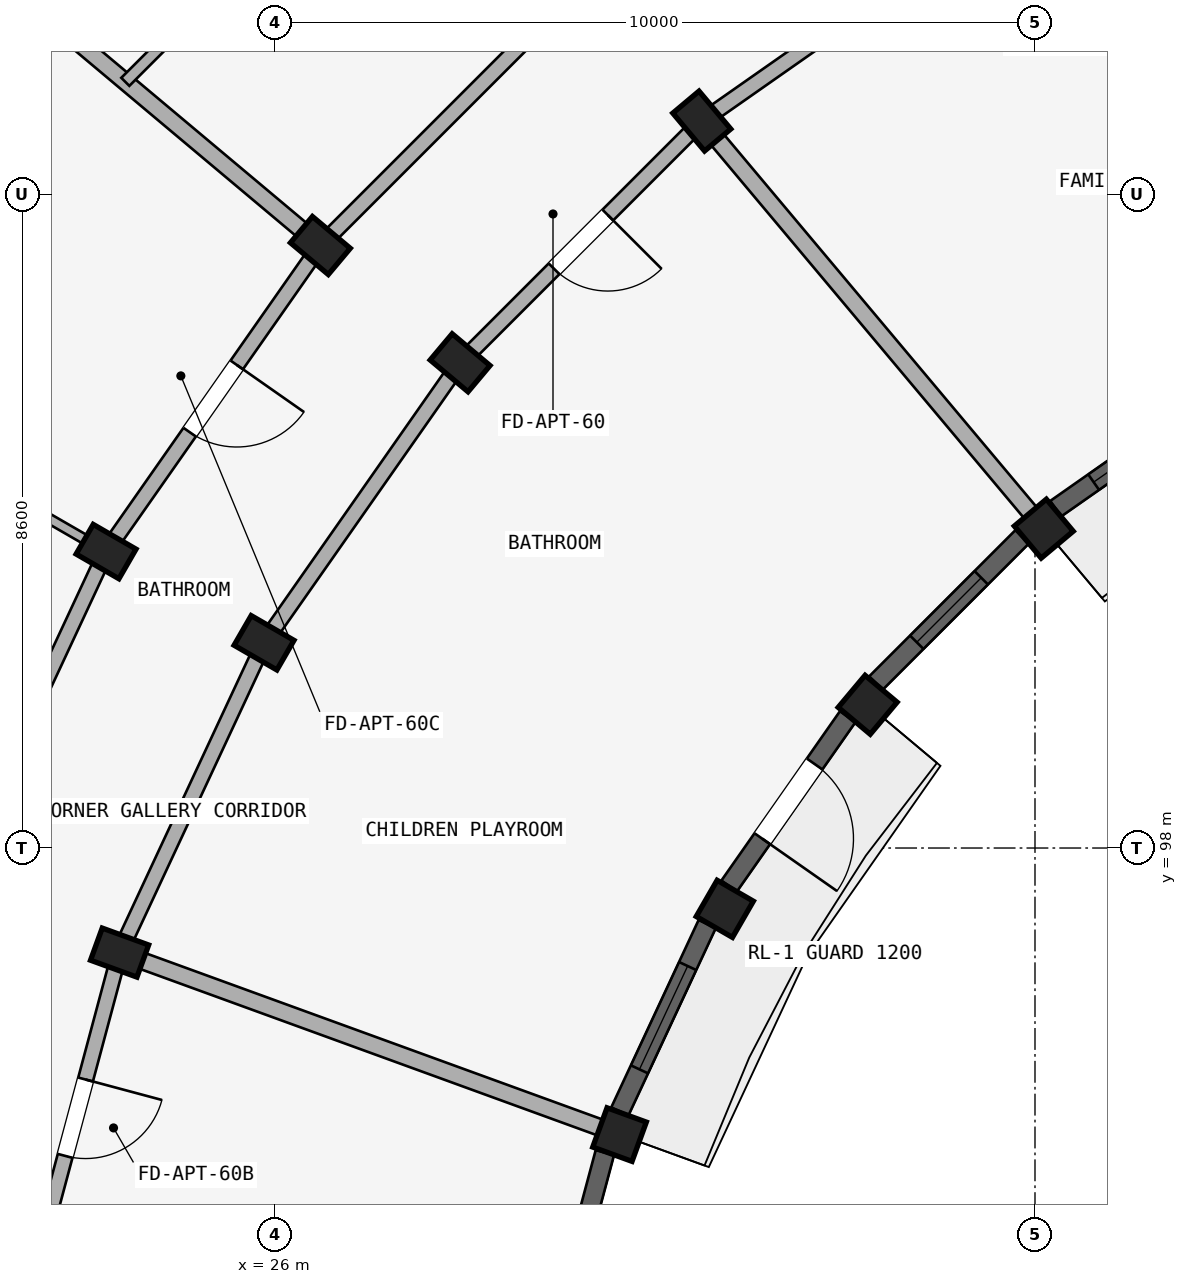
"""IFC4 building model, lengths in metres.
Left out: names, types, materials, properties, quantities, classifications, styles, units other than length and angle.
Written with IfcOpenShell. Run it as: python <this file> out.ifc"""

import sys

from ifc_helpers import new_model, si_unit, direction, frame, frame_2d, origin, origin_2d, place, context, subcontext, project, spatial, rectangle, extrude, element, fill, save


model = new_model("IFC4")
c1 = context("Model", 3, precision=1e-05, world=origin(), true_north=direction((0.0, 1.0)))
c2 = subcontext(c1, "Body", "Model", "MODEL_VIEW")
j1 = project(units=[si_unit("LENGTHUNIT", "METRE"), si_unit("PLANEANGLEUNIT", "RADIAN")], contexts=[c1])
p1 = place(None, origin())
s1 = spatial("IfcSite", under=j1, at=p1, CompositionType="ELEMENT")
p2 = place(p1, origin())
s2 = spatial("IfcBuilding", under=s1, at=p2, CompositionType="ELEMENT")
p3 = place(p2, frame((0.0, 0.0, 33.9)))
s3 = spatial("IfcBuildingStorey", under=s2, at=p3, CompositionType="ELEMENT", Elevation=33.9)
p4 = place(p3, frame((36.115, 102.202, 0.0), z_axis=(0.0, 0.0, 1.0), x_axis=(0.766044443119, 0.642787609687, 0.0)))
e1 = element("IfcColumn", 1, at=p4, inside=s3, PredefinedType="COLUMN", context=c2, shape_type="SweptSolid", body=[
    extrude(rectangle(XDim=0.55, YDim=0.55, at=origin_2d()), origin(), (0.0, 0.0, 1.0), 2.93),
])
p5 = place(p3, frame((31.616, 107.564, 0.0), z_axis=(0.0, 0.0, 1.0), x_axis=(0.766044443119, 0.642787609687, 0.0)))
e2 = element("IfcColumn", 2, at=p5, inside=s3, PredefinedType="COLUMN", context=c2, shape_type="SweptSolid", body=[
    extrude(rectangle(XDim=0.45, YDim=0.65, at=origin_2d()), origin(), (0.0, 0.0, 1.0), 2.93),
])
p6 = place(p3, frame((33.798, 99.885, 0.0), z_axis=(0.0, 0.0, 1.0), x_axis=(0.642787609687, 0.766044443119, 0.0)))
e3 = element("IfcColumn", 3, at=p6, inside=s3, PredefinedType="COLUMN", context=c2, shape_type="SweptSolid", body=[
    extrude(rectangle(XDim=0.55, YDim=0.55, at=origin_2d()), origin(), (0.0, 0.0, 1.0), 2.93),
])
for number, where, z_axis, x_axis in (
    (4, (28.436, 104.384, 0.0), (0.0, 0.0, 1.0), (0.643, 0.766, 0.0)),
    (5, (26.598, 105.927, 0.0), (0.0, 0.0, 1.0), (0.643, 0.766, 0.0)),
):
    element("IfcColumn", number, at=place(p3, frame(where, z_axis=z_axis, x_axis=x_axis)), inside=s3, PredefinedType="COLUMN", context=c2, shape_type="SweptSolid", body=[
        extrude(rectangle(XDim=0.45, YDim=0.65, at=origin_2d()), origin(), (0.0, 0.0, 1.0), 2.93),
    ])
p7 = place(p3, frame((31.919, 97.2, 0.0), z_axis=(0.0, 0.0, 1.0), x_axis=(0.5, 0.866025403784, 0.0)))
e6 = element("IfcColumn", 6, at=p7, inside=s3, PredefinedType="COLUMN", context=c2, shape_type="SweptSolid", body=[
    extrude(rectangle(XDim=0.55, YDim=0.55, at=origin_2d()), origin(), (0.0, 0.0, 1.0), 2.93),
])
for number, where, z_axis, x_axis in (
    (7, (25.856, 100.7, 0.0), (0.0, 0.0, 1.0), (0.5, 0.866, 0.0)),
    (8, (23.778, 101.9, 0.0), (0.0, 0.0, 1.0), (0.5, 0.866, 0.0)),
):
    element("IfcColumn", number, at=place(p3, frame(where, z_axis=z_axis, x_axis=x_axis)), inside=s3, PredefinedType="COLUMN", context=c2, shape_type="SweptSolid", body=[
        extrude(rectangle(XDim=0.45, YDim=0.65, at=origin_2d()), origin(), (0.0, 0.0, 1.0), 2.93),
    ])
p8 = place(p3, frame((30.534, 94.23, 0.0), z_axis=(0.0, 0.0, 1.0), x_axis=(0.342020143326, 0.939692620786, 0.0)))
e9 = element("IfcColumn", 9, at=p8, inside=s3, PredefinedType="COLUMN", context=c2, shape_type="SweptSolid", body=[
    extrude(rectangle(XDim=0.55, YDim=0.55, at=origin_2d()), origin(), (0.0, 0.0, 1.0), 2.93),
])
p9 = place(p3, frame((23.956, 96.624, 0.0), z_axis=(0.0, 0.0, 1.0), x_axis=(0.342020143326, 0.939692620786, 0.0)))
e10 = element("IfcColumn", 10, at=p9, inside=s3, PredefinedType="COLUMN", context=c2, shape_type="SweptSolid", body=[
    extrude(rectangle(XDim=0.45, YDim=0.65, at=origin_2d()), origin(), (0.0, 0.0, 1.0), 2.93),
])
p10 = place(p3, frame((35.3, 110.144, 0.0), z_axis=(0.0, 0.0, 1.0), x_axis=(-0.819155404658, -0.573571637217, 0.0)))
e11 = element("IfcWall", 11, at=p10, inside=s3, PredefinedType="STANDARD", context=c2, shape_type="SweptSolid", body=[
    extrude(rectangle(XDim=4.497, YDim=0.2, at=frame_2d((2.249, 0.0))), origin(), (0.0, 0.0, 1.0), 2.372),
])
p11 = place(p3, frame((31.616, 107.564, 0.0), z_axis=(0.0, 0.0, 1.0), x_axis=(-0.707106781187, -0.707106781187, 0.0)))
e12 = element("IfcWall", 12, at=p11, inside=s3, PredefinedType="STANDARD", context=c2, shape_type="SweptSolid", body=[
    extrude(rectangle(XDim=4.497, YDim=0.2, at=frame_2d((2.249, 0.0))), origin(), (0.0, 0.0, 1.0), 2.372),
])
p12 = place(p11, frame((1.749, 0.0, 0.0)))
e13 = element("IfcOpeningElement", 13, at=p12, cuts=e12, PredefinedType="OPENING", context=c2, shape_type="SweptSolid", body=[
    extrude(rectangle(XDim=1.0, YDim=2.15, at=frame_2d((0.5, 1.075))), frame((0.0, 0.11, 0.0), z_axis=(0.0, -1.0, 0.0), x_axis=(1.0, 0.0, 0.0)), (0.0, 0.0, 1.0), 0.22),
])
p13 = place(p3, frame((30.073, 109.402, 0.0), z_axis=(0.0, 0.0, 1.0), x_axis=(-0.707106781187, -0.707106781187, 0.0)))
e14 = element("IfcWall", 14, at=p13, inside=s3, PredefinedType="STANDARD", context=c2, shape_type="SweptSolid", body=[
    extrude(rectangle(XDim=4.916, YDim=0.2, at=frame_2d((2.458, 0.0))), origin(), (0.0, 0.0, 1.0), 2.372),
])
p14 = place(p3, frame((28.436, 104.384, 0.0), z_axis=(0.0, 0.0, 1.0), x_axis=(-0.573571637217, -0.819155404658, 0.0)))
e15 = element("IfcWall", 15, at=p14, inside=s3, PredefinedType="STANDARD", context=c2, shape_type="SweptSolid", body=[
    extrude(rectangle(XDim=4.497, YDim=0.2, at=frame_2d((2.249, 0.0))), origin(), (0.0, 0.0, 1.0), 2.372),
])
p15 = place(p3, frame((26.598, 105.927, 0.0), z_axis=(0.0, 0.0, 1.0), x_axis=(-0.573592335331, -0.819140911474, 0.0)))
e16 = element("IfcWall", 16, at=p15, inside=s3, PredefinedType="STANDARD", context=c2, shape_type="SweptSolid", body=[
    extrude(rectangle(XDim=4.916, YDim=0.2, at=frame_2d((2.458, 0.0))), origin(), (0.0, 0.0, 1.0), 2.372),
])
p16 = place(p15, frame((1.918, 0.0, 0.0)))
e17 = element("IfcOpeningElement", 17, at=p16, cuts=e16, PredefinedType="OPENING", context=c2, shape_type="SweptSolid", body=[
    extrude(rectangle(XDim=1.08, YDim=2.15, at=frame_2d((0.54, 1.075))), frame((0.0, 0.11, 0.0), z_axis=(0.0, -1.0, 0.0), x_axis=(1.0, 0.0, 0.0)), (0.0, 0.0, 1.0), 0.22),
])
p17 = place(p3, frame((25.856, 100.7, 0.0), z_axis=(0.0, 0.0, 1.0), x_axis=(-0.422617978463, -0.906307919131, 0.0)))
e18 = element("IfcWall", 18, at=p17, inside=s3, PredefinedType="STANDARD", context=c2, shape_type="SweptSolid", body=[
    extrude(rectangle(XDim=4.497, YDim=0.2, at=frame_2d((2.249, 0.0))), origin(), (0.0, 0.0, 1.0), 2.372),
])
p18 = place(p3, frame((23.778, 101.9, 0.0), z_axis=(0.0, 0.0, 1.0), x_axis=(-0.422629854778, -0.906302381024, 0.0)))
e19 = element("IfcWall", 19, at=p18, inside=s3, PredefinedType="STANDARD", context=c2, shape_type="SweptSolid", body=[
    extrude(rectangle(XDim=4.915, YDim=0.2, at=frame_2d((2.458, 0.0))), origin(), (0.0, 0.0, 1.0), 2.372),
])
p19 = place(p3, frame((23.956, 96.624, 0.0), z_axis=(0.0, 0.0, 1.0), x_axis=(-0.258787642463, -0.965934240054, 0.0)))
e20 = element("IfcWall", 20, at=p19, inside=s3, PredefinedType="STANDARD", context=c2, shape_type="SweptSolid", body=[
    extrude(rectangle(XDim=4.497, YDim=0.2, at=frame_2d((2.249, 0.0))), origin(), (0.0, 0.0, 1.0), 2.372),
])
p20 = place(p19, frame((1.729, 0.0, 0.0)))
e21 = element("IfcOpeningElement", 21, at=p20, cuts=e20, PredefinedType="OPENING", context=c2, shape_type="SweptSolid", body=[
    extrude(rectangle(XDim=1.04, YDim=2.15, at=frame_2d((0.52, 1.075))), frame((0.0, 0.11, 0.0), z_axis=(0.0, -1.0, 0.0), x_axis=(1.0, 0.0, 0.0)), (0.0, 0.0, 1.0), 0.22),
])
p21 = place(p3, frame((35.987, 102.355, 0.0), z_axis=(0.0, 0.0, 1.0), x_axis=(-0.642784846501, 0.766046761698, 0.0)))
e22 = element("IfcWall", 22, at=p21, inside=s3, PredefinedType="STANDARD", context=c2, shape_type="SweptSolid", body=[
    extrude(rectangle(XDim=6.75, YDim=0.22, at=frame_2d((3.375, 0.0))), origin(), (0.0, 0.0, 1.0), 2.372),
])
p22 = place(p3, frame((26.521, 105.991, 0.0), z_axis=(0.0, 0.0, 1.0), x_axis=(-0.766046835987, 0.642784757967, 0.0)))
e23 = element("IfcWall", 23, at=p22, inside=s3, PredefinedType="STANDARD", context=c2, shape_type="SweptSolid", body=[
    extrude(rectangle(XDim=17.42, YDim=0.22, at=frame_2d((8.71, 0.0))), origin(), (0.0, 0.0, 1.0), 2.372),
])
p23 = place(p3, frame((23.691, 101.95, 0.0), z_axis=(0.0, 0.0, 1.0), x_axis=(-0.866026648973, 0.499997843263, 0.0)))
e24 = element("IfcWall", 24, at=p23, inside=s3, PredefinedType="PARTITIONING", context=c2, shape_type="SweptSolid", body=[
    extrude(rectangle(XDim=17.42, YDim=0.125, at=frame_2d((8.71, 0.0))), origin(), (0.0, 0.0, 1.0), 2.372),
])
p24 = place(p23, frame((7.5, 0.0, 0.0)))
e25 = element("IfcOpeningElement", 25, at=p24, cuts=e24, PredefinedType="OPENING", context=c2, shape_type="SweptSolid", body=[
    extrude(rectangle(XDim=0.8, YDim=2.1, at=frame_2d((0.4, 1.05))), frame((0.0, 0.073, 0.0), z_axis=(0.0, -1.0, 0.0), x_axis=(1.0, 0.0, 0.0)), (0.0, 0.0, 1.0), 0.145),
])
p25 = place(p3, frame((30.346, 94.298, 0.0), z_axis=(0.0, 0.0, 1.0), x_axis=(-0.939696231917, 0.342010221662, 0.0)))
e26 = element("IfcWall", 26, at=p25, inside=s3, PredefinedType="STANDARD", context=c2, shape_type="SweptSolid", body=[
    extrude(rectangle(XDim=6.75, YDim=0.22, at=frame_2d((3.375, 0.0))), origin(), (0.0, 0.0, 1.0), 2.372),
])
p26 = place(p3, frame((27.92, 111.969, 0.0), z_axis=(0.0, 0.0, 1.0), x_axis=(-0.707106781187, -0.707106781187, 0.0)))
e27 = element("IfcWall", 27, at=p26, inside=s3, PredefinedType="PLUMBINGWALL", context=c2, shape_type="SweptSolid", body=[
    extrude(rectangle(XDim=5.5, YDim=0.15, at=frame_2d((2.75, 0.0))), origin(), (0.0, 0.0, 1.0), 2.372),
])
p27 = place(p26, frame((2.37, 0.0, 0.0)))
e28 = element("IfcOpeningElement", 28, at=p27, cuts=e27, PredefinedType="OPENING", context=c2, shape_type="SweptSolid", body=[
    extrude(rectangle(XDim=0.76, YDim=2.05, at=frame_2d((0.38, 1.025))), frame((0.0, 0.085, 0.0), z_axis=(0.0, -1.0, 0.0), x_axis=(1.0, 0.0, 0.0)), (0.0, 0.0, 1.0), 0.17),
])
p28 = place(p3, frame((38.5, 104.024, 0.0), z_axis=(0.0, 0.0, 1.0), x_axis=(-0.819126475299, -0.573612950921, 0.0)))
e29 = element("IfcWall", 29, at=p28, inside=s3, PredefinedType="STANDARD", context=c2, shape_type="SweptSolid", body=[
    extrude(rectangle(XDim=2.72, YDim=0.25, at=frame_2d((1.36, 0.0))), origin(), (0.0, 0.0, 1.0), 2.472),
])
p29 = place(p28, frame((0.61, 0.0, 0.622)))
e30 = element("IfcOpeningElement", 30, at=p29, cuts=e29, PredefinedType="OPENING", context=c2, shape_type="SweptSolid", body=[
    extrude(rectangle(XDim=1.5, YDim=1.65, at=frame_2d((0.75, 0.825))), frame((0.0, 0.135, 0.0), z_axis=(0.0, -1.0, 0.0), x_axis=(1.0, 0.0, 0.0)), (0.0, 0.0, 1.0), 0.27),
])
p30 = place(p3, frame((35.83, 102.093, 0.0), z_axis=(0.0, 0.0, 1.0), x_axis=(-0.707106781187, -0.707106781187, 0.0)))
e31 = element("IfcWall", 31, at=p30, inside=s3, PredefinedType="STANDARD", context=c2, shape_type="SweptSolid", body=[
    extrude(rectangle(XDim=2.72, YDim=0.25, at=frame_2d((1.36, 0.0))), origin(), (0.0, 0.0, 1.0), 2.472),
])
p31 = place(p30, frame((0.76, 0.0, 0.772)))
e32 = element("IfcOpeningElement", 32, at=p31, cuts=e31, PredefinedType="OPENING", context=c2, shape_type="SweptSolid", body=[
    extrude(rectangle(XDim=1.2, YDim=1.5, at=frame_2d((0.6, 0.75))), frame((0.0, 0.135, 0.0), z_axis=(0.0, -1.0, 0.0), x_axis=(1.0, 0.0, 0.0)), (0.0, 0.0, 1.0), 0.27),
])
p32 = place(p3, frame((33.536, 99.728, 0.0), z_axis=(0.0, 0.0, 1.0), x_axis=(-0.573612950921, -0.819126475299, 0.0)))
e33 = element("IfcWall", 33, at=p32, inside=s3, PredefinedType="STANDARD", context=c2, shape_type="SweptSolid", body=[
    extrude(rectangle(XDim=2.72, YDim=0.25, at=frame_2d((1.36, 0.0))), origin(), (0.0, 0.0, 1.0), 2.472),
])
p33 = place(p32, frame((0.76, 0.0, 0.0)))
e34 = element("IfcOpeningElement", 34, at=p33, cuts=e33, PredefinedType="OPENING", context=c2, shape_type="SweptSolid", body=[
    extrude(rectangle(XDim=1.2, YDim=2.15, at=frame_2d((0.6, 1.075))), frame((0.0, 0.135, 0.0), z_axis=(0.0, -1.0, 0.0), x_axis=(1.0, 0.0, 0.0)), (0.0, 0.0, 1.0), 0.27),
])
p34 = place(p3, frame((31.688, 97.0, 0.0), z_axis=(0.0, 0.0, 1.0), x_axis=(-0.422629903269, -0.906302358412, 0.0)))
e35 = element("IfcWall", 35, at=p34, inside=s3, PredefinedType="STANDARD", context=c2, shape_type="SweptSolid", body=[
    extrude(rectangle(XDim=2.72, YDim=0.25, at=frame_2d((1.36, 0.0))), origin(), (0.0, 0.0, 1.0), 2.472),
])
p35 = place(p34, frame((0.61, 0.0, 0.622)))
e36 = element("IfcOpeningElement", 36, at=p35, cuts=e35, PredefinedType="OPENING", context=c2, shape_type="SweptSolid", body=[
    extrude(rectangle(XDim=1.5, YDim=1.65, at=frame_2d((0.75, 0.825))), frame((0.0, 0.135, 0.0), z_axis=(0.0, -1.0, 0.0), x_axis=(1.0, 0.0, 0.0)), (0.0, 0.0, 1.0), 0.27),
])
p36 = place(p3, frame((30.341, 93.993, 0.0), z_axis=(0.0, 0.0, 1.0), x_axis=(-0.258807879411, -0.965928818058, 0.0)))
e37 = element("IfcWall", 37, at=p36, inside=s3, PredefinedType="STANDARD", context=c2, shape_type="SweptSolid", body=[
    extrude(rectangle(XDim=2.72, YDim=0.25, at=frame_2d((1.36, 0.0))), origin(), (0.0, 0.0, 1.0), 2.472),
])
p37 = place(p36, frame((0.76, 0.0, 0.772)))
e38 = element("IfcOpeningElement", 38, at=p37, cuts=e37, PredefinedType="OPENING", context=c2, shape_type="SweptSolid", body=[
    extrude(rectangle(XDim=1.2, YDim=1.5, at=frame_2d((0.6, 0.75))), frame((0.0, 0.135, 0.0), z_axis=(0.0, -1.0, 0.0), x_axis=(1.0, 0.0, 0.0)), (0.0, 0.0, 1.0), 0.27),
])
p38 = place(p29, origin())
e39 = element("IfcWindow", 39, at=p38, inside=s3, PartitioningType="DOUBLE_PANEL_VERTICAL", PredefinedType="WINDOW", context=c2, shape_type="SweptSolid", body=[
    extrude(rectangle(XDim=1.5, YDim=1.65, at=frame_2d((0.75, 0.825))), frame((0.0, 0.03, 0.0), z_axis=(0.0, -1.0, 0.0), x_axis=(1.0, 0.0, 0.0)), (0.0, 0.0, 1.0), 0.06),
])
fill(e30, e39)
p39 = place(p31, origin())
e40 = element("IfcWindow", 40, at=p39, inside=s3, PartitioningType="SINGLE_PANEL", PredefinedType="WINDOW", context=c2, shape_type="SweptSolid", body=[
    extrude(rectangle(XDim=1.2, YDim=1.5, at=frame_2d((0.6, 0.75))), frame((0.0, 0.03, 0.0), z_axis=(0.0, -1.0, 0.0), x_axis=(1.0, 0.0, 0.0)), (0.0, 0.0, 1.0), 0.06),
])
fill(e32, e40)
p40 = place(p35, origin())
e41 = element("IfcWindow", 41, at=p40, inside=s3, PartitioningType="DOUBLE_PANEL_VERTICAL", PredefinedType="WINDOW", context=c2, shape_type="SweptSolid", body=[
    extrude(rectangle(XDim=1.5, YDim=1.65, at=frame_2d((0.75, 0.825))), frame((0.0, 0.03, 0.0), z_axis=(0.0, -1.0, 0.0), x_axis=(1.0, 0.0, 0.0)), (0.0, 0.0, 1.0), 0.06),
])
fill(e36, e41)
p41 = place(p16, origin())
e42 = element("IfcDoor", 42, at=p41, inside=s3, OperationType="SINGLE_SWING_LEFT", PredefinedType="DOOR", context=c2, shape_type="SweptSolid", body=[
    extrude(rectangle(XDim=1.08, YDim=2.15, at=frame_2d((0.54, 1.075))), frame((0.0, 0.025, 0.0), z_axis=(0.0, -1.0, 0.0), x_axis=(1.0, 0.0, 0.0)), (0.0, 0.0, 1.0), 0.05),
])
fill(e17, e42)
p42 = place(p12, origin())
e43 = element("IfcDoor", 43, at=p42, inside=s3, OperationType="SINGLE_SWING_LEFT", PredefinedType="DOOR", context=c2, shape_type="SweptSolid", body=[
    extrude(rectangle(XDim=1.0, YDim=2.15, at=frame_2d((0.5, 1.075))), frame((0.0, 0.025, 0.0), z_axis=(0.0, -1.0, 0.0), x_axis=(1.0, 0.0, 0.0)), (0.0, 0.0, 1.0), 0.05),
])
fill(e13, e43)
p43 = place(p20, frame((1.04, 0.0, 0.0), z_axis=(0.0, 0.0, 1.0), x_axis=(-1.0, 0.0, 0.0)))
e44 = element("IfcDoor", 44, at=p43, inside=s3, OperationType="SINGLE_SWING_RIGHT", PredefinedType="DOOR", context=c2, shape_type="SweptSolid", body=[
    extrude(rectangle(XDim=1.04, YDim=2.15, at=frame_2d((0.52, 1.075))), frame((0.0, 0.025, 0.0), z_axis=(0.0, -1.0, 0.0), x_axis=(1.0, 0.0, 0.0)), (0.0, 0.0, 1.0), 0.05),
])
fill(e21, e44)
p44 = place(p33, origin())
e45 = element("IfcDoor", 45, at=p44, inside=s3, OperationType="SINGLE_SWING_RIGHT", PredefinedType="DOOR", context=c2, shape_type="SweptSolid", body=[
    extrude(rectangle(XDim=1.2, YDim=2.15, at=frame_2d((0.6, 1.075))), frame((0.0, 0.025, 0.0), z_axis=(0.0, -1.0, 0.0), x_axis=(1.0, 0.0, 0.0)), (0.0, 0.0, 1.0), 0.05),
])
fill(e34, e45)
save(model, sys.argv[1])
